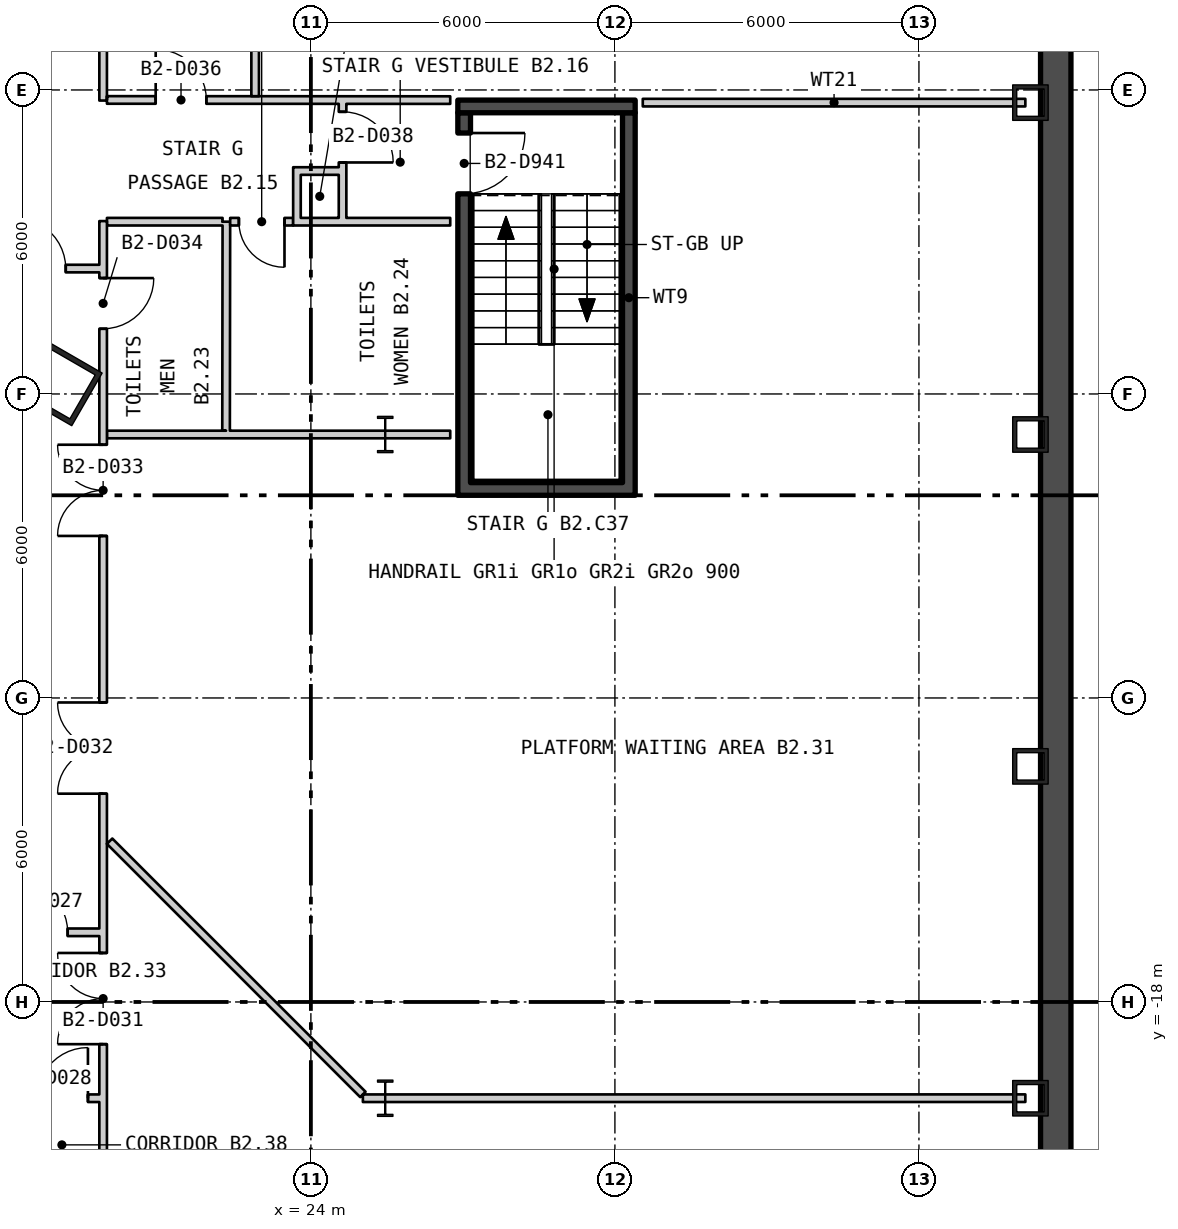
"""IFC4 building model, lengths in metres.
Left out: names, types, materials, properties, quantities, classifications, styles, units other than length and angle.
Written with IfcOpenShell. Run it as: python <this file> out.ifc"""

import sys

from ifc_helpers import new_model, si_unit, direction, frame, frame_2d, origin, origin_2d, place, context, subcontext, project, spatial, rectangle, hollow_rectangle, i_section, extrude, element, fill, save


model = new_model("IFC4")
c1 = context("Model", 3, precision=1e-05, world=origin(), true_north=direction((0.0, 1.0)))
c2 = subcontext(c1, "Body", "Model", "MODEL_VIEW")
j1 = project(units=[si_unit("LENGTHUNIT", "METRE"), si_unit("PLANEANGLEUNIT", "RADIAN")], contexts=[c1])
p1 = place(None, origin())
s1 = spatial("IfcSite", under=j1, at=p1, CompositionType="ELEMENT")
p2 = place(p1, origin())
s2 = spatial("IfcBuilding", under=s1, at=p2, CompositionType="ELEMENT")
p3 = place(p2, frame((0.0, 0.0, -11.4)))
s3 = spatial("IfcBuildingStorey", under=s2, at=p3, CompositionType="ELEMENT", Elevation=-11.4)
p4 = place(p3, frame((19.061, -5.807, 0.0), z_axis=(0.0, 0.0, 1.0), x_axis=(0.5, 0.866025403784, 0.0)))
e1 = element("IfcColumn", 1, at=p4, inside=s3, PredefinedType="COLUMN", context=c2, shape_type="SweptSolid", body=[
    extrude(hollow_rectangle(XDim=1.2, YDim=1.2, WallThickness=0.1, at=origin_2d()), origin(), (0.0, 0.0, 1.0), 5.7),
])
for number, where, z_axis, x_axis in (
    (2, (38.2, -19.9, 0.0), (0.0, 0.0, 1.0), (0.0, 1.0, 0.0)),
    (3, (38.2, -13.35, 0.0), (0.0, 0.0, 1.0), (0.0, 1.0, 0.0)),
    (4, (38.2, -6.8, 0.0), (0.0, 0.0, 1.0), (0.0, 1.0, 0.0)),
    (5, (38.2, -0.25, 0.0), (0.0, 0.0, 1.0), (0.0, 1.0, 0.0)),
):
    element("IfcColumn", number, at=place(p3, frame(where, z_axis=z_axis, x_axis=x_axis)), inside=s3, PredefinedType="COLUMN", context=c2, shape_type="SweptSolid", body=[
        extrude(hollow_rectangle(XDim=0.7, YDim=0.7, WallThickness=0.08, at=origin_2d()), origin(), (0.0, 0.0, 1.0), 5.7),
    ])
for number, where, z_axis, x_axis in (
    (6, (25.467, -6.8, 0.0), (0.0, 0.0, 1.0), (1.0, 0.0, 0.0)),
    (7, (25.467, -19.9, 0.0), (0.0, 0.0, 1.0), (1.0, 0.0, 0.0)),
):
    element("IfcColumn", number, at=place(p3, frame(where, z_axis=z_axis, x_axis=x_axis)), inside=s3, PredefinedType="COLUMN", context=c2, shape_type="SweptSolid", body=[
        extrude(i_section(OverallWidth=0.304, OverallDepth=0.716, WebThickness=0.021, FlangeThickness=0.04, at=origin_2d()), origin(), (0.0, 0.0, 1.0), 5.7),
    ])
p5 = place(p3, frame((38.7, -33.2, -0.4), z_axis=(0.0, 0.0, 1.0), x_axis=(0.0, 1.0, 0.0)))
e8 = element("IfcWall", 8, at=p5, inside=s3, PredefinedType="STANDARD", context=c2, shape_type="SweptSolid", body=[
    extrude(rectangle(XDim=52.8, YDim=0.6, at=frame_2d((26.4, 0.0))), origin(), (0.0, 0.0, 1.0), 5.7),
])
p6 = place(p3, frame((27.025, -7.75, 0.0), z_axis=(0.0, 0.0, 1.0), x_axis=(0.0, 1.0, 0.0)))
e9 = element("IfcWall", 9, at=p6, inside=s3, PredefinedType="SHEAR", context=c2, shape_type="SweptSolid", body=[
    extrude(rectangle(XDim=7.3, YDim=0.25, at=frame_2d((3.65, 0.0))), origin(), (0.0, 0.0, 1.0), 5.25),
])
p7 = place(p6, frame((5.7, 0.0, 0.0)))
e10 = element("IfcOpeningElement", 10, at=p7, cuts=e9, PredefinedType="OPENING", context=c2, shape_type="SweptSolid", body=[
    extrude(rectangle(XDim=1.2, YDim=2.1, at=frame_2d((0.6, 1.05))), frame((0.0, 0.135, 0.0), z_axis=(0.0, -1.0, 0.0), x_axis=(1.0, 0.0, 0.0)), (0.0, 0.0, 1.0), 0.27),
])
p8 = place(p3, frame((30.275, -7.75, 0.0), z_axis=(0.0, 0.0, 1.0), x_axis=(0.0, 1.0, 0.0)))
e11 = element("IfcWall", 11, at=p8, inside=s3, PredefinedType="SHEAR", context=c2, shape_type="SweptSolid", body=[
    extrude(rectangle(XDim=7.3, YDim=0.25, at=frame_2d((3.65, 0.0))), origin(), (0.0, 0.0, 1.0), 5.25),
])
for number, where, z_axis, x_axis in (
    (12, (26.9, -7.875, 0.0), (0.0, 0.0, 1.0), (1.0, 0.0, 0.0)),
    (13, (26.9, -0.325, 0.0), (0.0, 0.0, 1.0), (1.0, 0.0, 0.0)),
):
    element("IfcWall", number, at=place(p3, frame(where, z_axis=z_axis, x_axis=x_axis)), inside=s3, PredefinedType="SHEAR", context=c2, shape_type="SweptSolid", body=[
        extrude(rectangle(XDim=3.5, YDim=0.25, at=frame_2d((1.75, 0.0))), origin(), (0.0, 0.0, 1.0), 5.25),
    ])
p9 = place(p3, frame((17.5, -3.525, 0.0), z_axis=(0.0, 0.0, 1.0), x_axis=(1.0, 0.0, 0.0)))
e14 = element("IfcWall", 14, at=p9, inside=s3, PredefinedType="PARTITIONING", context=c2, shape_type="SweptSolid", body=[
    extrude(rectangle(XDim=2.325, YDim=0.15, at=frame_2d((1.163, 0.0))), origin(), (0.0, 0.0, 1.0), 5.25),
])
p10 = place(p9, frame((0.662, 0.0, 0.0)))
e15 = element("IfcOpeningElement", 15, at=p10, cuts=e14, PredefinedType="OPENING", context=c2, shape_type="SweptSolid", body=[
    extrude(rectangle(XDim=1.0, YDim=2.1, at=frame_2d((0.5, 1.05))), frame((0.0, 0.085, 0.0), z_axis=(0.0, -1.0, 0.0), x_axis=(1.0, 0.0, 0.0)), (0.0, 0.0, 1.0), 0.17),
])
p11 = place(p3, frame((17.575, -16.625, 0.0), z_axis=(0.0, 0.0, 1.0), x_axis=(1.0, 0.0, 0.0)))
e16 = element("IfcWall", 16, at=p11, inside=s3, PredefinedType="PARTITIONING", context=c2, shape_type="SweptSolid", body=[
    extrude(rectangle(XDim=2.25, YDim=0.15, at=frame_2d((1.125, 0.0))), origin(), (0.0, 0.0, 1.0), 5.25),
])
p12 = place(p11, frame((0.625, 0.0, 0.0)))
e17 = element("IfcOpeningElement", 17, at=p12, cuts=e16, PredefinedType="OPENING", context=c2, shape_type="SweptSolid", body=[
    extrude(rectangle(XDim=1.0, YDim=2.1, at=frame_2d((0.5, 1.05))), frame((0.0, 0.085, 0.0), z_axis=(0.0, -1.0, 0.0), x_axis=(1.0, 0.0, 0.0)), (0.0, 0.0, 1.0), 0.17),
])
p13 = place(p3, frame((18.375, -19.9, 0.0), z_axis=(0.0, 0.0, 1.0), x_axis=(1.0, 0.0, 0.0)))
e18 = element("IfcWall", 18, at=p13, inside=s3, PredefinedType="PARTITIONING", context=c2, shape_type="SweptSolid", body=[
    extrude(rectangle(XDim=1.45, YDim=0.15, at=frame_2d((0.725, 0.0))), origin(), (0.0, 0.0, 1.0), 5.25),
])
p14 = place(p13, frame((0.225, 0.0, 0.0)))
e19 = element("IfcOpeningElement", 19, at=p14, cuts=e18, PredefinedType="OPENING", context=c2, shape_type="SweptSolid", body=[
    extrude(rectangle(XDim=1.0, YDim=2.1, at=frame_2d((0.5, 1.05))), frame((0.0, 0.085, 0.0), z_axis=(0.0, -1.0, 0.0), x_axis=(1.0, 0.0, 0.0)), (0.0, 0.0, 1.0), 0.17),
])
p15 = place(p3, frame((19.9, -23.775, 0.0), z_axis=(0.0, 0.0, 1.0), x_axis=(0.0, 1.0, 0.0)))
e20 = element("IfcWall", 20, at=p15, inside=s3, PredefinedType="PARTITIONING", context=c2, shape_type="SweptSolid", body=[
    extrude(rectangle(XDim=21.187, YDim=0.15, at=frame_2d((10.594, 0.0))), origin(), (0.0, 0.0, 1.0), 5.25),
])
p16 = place(p15, frame((0.275, 0.0, 0.0)))
e21 = element("IfcOpeningElement", 21, at=p16, cuts=e20, PredefinedType="OPENING", context=c2, shape_type="SweptSolid", body=[
    extrude(rectangle(XDim=1.0, YDim=2.1, at=frame_2d((0.5, 1.05))), frame((0.0, 0.085, 0.0), z_axis=(0.0, -1.0, 0.0), x_axis=(1.0, 0.0, 0.0)), (0.0, 0.0, 1.0), 0.17),
])
p17 = place(p15, frame((4.942, 0.0, 0.0)))
e22 = element("IfcOpeningElement", 22, at=p17, cuts=e20, PredefinedType="OPENING", context=c2, shape_type="SweptSolid", body=[
    extrude(rectangle(XDim=1.8, YDim=2.1, at=frame_2d((0.9, 1.05))), frame((0.0, 0.085, 0.0), z_axis=(0.0, -1.0, 0.0), x_axis=(1.0, 0.0, 0.0)), (0.0, 0.0, 1.0), 0.17),
])
p18 = place(p15, frame((9.886, 0.0, 0.0)))
e23 = element("IfcOpeningElement", 23, at=p18, cuts=e20, PredefinedType="OPENING", context=c2, shape_type="SweptSolid", body=[
    extrude(rectangle(XDim=1.8, YDim=2.1, at=frame_2d((0.9, 1.05))), frame((0.0, 0.085, 0.0), z_axis=(0.0, -1.0, 0.0), x_axis=(1.0, 0.0, 0.0)), (0.0, 0.0, 1.0), 0.17),
])
p19 = place(p15, frame((14.973, 0.0, 0.0)))
e24 = element("IfcOpeningElement", 24, at=p19, cuts=e20, PredefinedType="OPENING", context=c2, shape_type="SweptSolid", body=[
    extrude(rectangle(XDim=1.8, YDim=2.1, at=frame_2d((0.9, 1.05))), frame((0.0, 0.085, 0.0), z_axis=(0.0, -1.0, 0.0), x_axis=(1.0, 0.0, 0.0)), (0.0, 0.0, 1.0), 0.17),
])
p20 = place(p15, frame((19.062, 0.0, 0.0)))
e25 = element("IfcOpeningElement", 25, at=p20, cuts=e20, PredefinedType="OPENING", context=c2, shape_type="SweptSolid", body=[
    extrude(rectangle(XDim=1.0, YDim=2.1, at=frame_2d((0.5, 1.05))), frame((0.0, 0.085, 0.0), z_axis=(0.0, -1.0, 0.0), x_axis=(1.0, 0.0, 0.0)), (0.0, 0.0, 1.0), 0.17),
])
p21 = place(p3, frame((19.9, -0.209, 0.0), z_axis=(0.0, 0.0, 1.0), x_axis=(0.0, 1.0, 0.0)))
e26 = element("IfcWall", 26, at=p21, inside=s3, PredefinedType="PARTITIONING", context=c2, shape_type="SweptSolid", body=[
    extrude(rectangle(XDim=18.134, YDim=0.15, at=frame_2d((9.067, 0.0))), origin(), (0.0, 0.0, 1.0), 5.25),
])
p22 = place(p21, frame((9.773, 0.0, 0.0)))
e27 = element("IfcOpeningElement", 27, at=p22, cuts=e26, PredefinedType="OPENING", context=c2, shape_type="SweptSolid", body=[
    extrude(rectangle(XDim=1.0, YDim=2.1, at=frame_2d((0.5, 1.05))), frame((0.0, 0.085, 0.0), z_axis=(0.0, -1.0, 0.0), x_axis=(1.0, 0.0, 0.0)), (0.0, 0.0, 1.0), 0.17),
])
p23 = place(p3, frame((19.975, -6.8, 0.0), z_axis=(0.0, 0.0, 1.0), x_axis=(1.0, 0.0, 0.0)))
e28 = element("IfcWall", 28, at=p23, inside=s3, PredefinedType="PARTITIONING", context=c2, shape_type="SweptSolid", body=[
    extrude(rectangle(XDim=6.775, YDim=0.15, at=frame_2d((3.388, 0.0))), origin(), (0.0, 0.0, 1.0), 5.25),
])
p24 = place(p3, frame((19.975, -2.6, 0.0), z_axis=(0.0, 0.0, 1.0), x_axis=(1.0, 0.0, 0.0)))
e29 = element("IfcWall", 29, at=p24, inside=s3, PredefinedType="PARTITIONING", context=c2, shape_type="SweptSolid", body=[
    extrude(rectangle(XDim=2.282, YDim=0.15, at=frame_2d((1.141, 0.0))), origin(), (0.0, 0.0, 1.0), 5.25),
])
p25 = place(p3, frame((19.975, -0.197, 0.0), z_axis=(0.0, 0.0, 1.0), x_axis=(0.999999901962, -0.000442804385, 0.0)))
e30 = element("IfcWall", 30, at=p25, inside=s3, PredefinedType="PARTITIONING", context=c2, shape_type="SweptSolid", body=[
    extrude(rectangle(XDim=6.775, YDim=0.15, at=frame_2d((3.388, 0.0))), origin(), (0.0, 0.0, 1.0), 5.25),
])
p26 = place(p25, frame((0.962, 0.0, 0.0)))
e31 = element("IfcOpeningElement", 31, at=p26, cuts=e30, PredefinedType="OPENING", context=c2, shape_type="SweptSolid", body=[
    extrude(rectangle(XDim=1.0, YDim=2.1, at=frame_2d((0.5, 1.05))), frame((0.0, 0.085, 0.0), z_axis=(0.0, -1.0, 0.0), x_axis=(1.0, 0.0, 0.0)), (0.0, 0.0, 1.0), 0.17),
])
p27 = place(p3, frame((20.028, -14.827, 0.0), z_axis=(0.0, 0.0, 1.0), x_axis=(0.707106781187, -0.707106781187, 0.0)))
e32 = element("IfcWall", 32, at=p27, inside=s3, PredefinedType="PARTITIONING", context=c2, shape_type="SweptSolid", body=[
    extrude(rectangle(XDim=7.068, YDim=0.15, at=frame_2d((3.534, 0.0))), origin(), (0.0, 0.0, 1.0), 5.25),
])
p28 = place(p3, frame((22.326, -6.725, 0.0), z_axis=(0.0, 0.0, 1.0), x_axis=(0.001454543916, 0.99999894215, 0.0)))
e33 = element("IfcWall", 33, at=p28, inside=s3, PredefinedType="PARTITIONING", context=c2, shape_type="SweptSolid", body=[
    extrude(rectangle(XDim=4.125, YDim=0.15, at=frame_2d((2.062, 0.0))), origin(), (0.0, 0.0, 1.0), 5.25),
])
p29 = place(p3, frame((22.407, -2.6, 0.0), z_axis=(0.0, 0.0, 1.0), x_axis=(1.0, 0.0, 0.0)))
e34 = element("IfcWall", 34, at=p29, inside=s3, PredefinedType="PARTITIONING", context=c2, shape_type="SweptSolid", body=[
    extrude(rectangle(XDim=1.243, YDim=0.15, at=frame_2d((0.622, 0.0))), origin(), (0.0, 0.0, 1.0), 5.25),
])
p30 = place(p29, frame((0.172, 0.0, 0.0)))
e35 = element("IfcOpeningElement", 35, at=p30, cuts=e34, PredefinedType="OPENING", context=c2, shape_type="SweptSolid", body=[
    extrude(rectangle(XDim=0.9, YDim=2.1, at=frame_2d((0.45, 1.05))), frame((0.0, 0.085, 0.0), z_axis=(0.0, -1.0, 0.0), x_axis=(1.0, 0.0, 0.0)), (0.0, 0.0, 1.0), 0.17),
])
p31 = place(p3, frame((22.9, -0.123, 0.0), z_axis=(0.0, 0.0, 1.0), x_axis=(0.0, 1.0, 0.0)))
e36 = element("IfcWall", 36, at=p31, inside=s3, PredefinedType="PARTITIONING", context=c2, shape_type="SweptSolid", body=[
    extrude(rectangle(XDim=2.851, YDim=0.15, at=frame_2d((1.425, 0.0))), origin(), (0.0, 0.0, 1.0), 5.25),
])
p32 = place(p3, frame((23.725, -2.675, 0.0), z_axis=(0.0, 0.0, 1.0), x_axis=(0.0, 1.0, 0.0)))
e37 = element("IfcWall", 37, at=p32, inside=s3, PredefinedType="PARTITIONING", context=c2, shape_type="SweptSolid", body=[
    extrude(rectangle(XDim=1.15, YDim=0.15, at=frame_2d((0.575, 0.0))), origin(), (0.0, 0.0, 1.0), 5.25),
])
for number, where, z_axis, x_axis in (
    (38, (23.8, -2.6, 0.0), (0.0, 0.0, 1.0), (1.0, 0.0, 0.0)),
    (39, (23.8, -1.6, 0.0), (0.0, 0.0, 1.0), (1.0, 0.0, 0.0)),
):
    element("IfcWall", number, at=place(p3, frame(where, z_axis=z_axis, x_axis=x_axis)), inside=s3, PredefinedType="PARTITIONING", context=c2, shape_type="SweptSolid", body=[
        extrude(rectangle(XDim=0.75, YDim=0.15, at=frame_2d((0.375, 0.0))), origin(), (0.0, 0.0, 1.0), 5.25),
    ])
p33 = place(p3, frame((24.625, -2.675, 0.0), z_axis=(0.0, 0.0, 1.0), x_axis=(0.0, 1.0, 0.0)))
e40 = element("IfcWall", 40, at=p33, inside=s3, PredefinedType="PARTITIONING", context=c2, shape_type="SweptSolid", body=[
    extrude(rectangle(XDim=1.087, YDim=0.15, at=frame_2d((0.543, 0.0))), origin(), (0.0, 0.0, 1.0), 5.25),
])
p34 = place(p3, frame((24.625, -1.588, 0.0), z_axis=(0.0, 0.0, 1.0), x_axis=(0.0, 1.0, 0.0)))
e41 = element("IfcWall", 41, at=p34, inside=s3, PredefinedType="PARTITIONING", context=c2, shape_type="SweptSolid", body=[
    extrude(rectangle(XDim=1.314, YDim=0.15, at=frame_2d((0.657, 0.0))), origin(), (0.0, 0.0, 1.0), 5.25),
])
p35 = place(p34, frame((0.157, 0.0, 0.0)))
e42 = element("IfcOpeningElement", 42, at=p35, cuts=e41, PredefinedType="OPENING", context=c2, shape_type="SweptSolid", body=[
    extrude(rectangle(XDim=1.0, YDim=2.1, at=frame_2d((0.5, 1.05))), frame((0.0, 0.085, 0.0), z_axis=(0.0, -1.0, 0.0), x_axis=(1.0, 0.0, 0.0)), (0.0, 0.0, 1.0), 0.17),
])
p36 = place(p3, frame((24.7, -2.6, 0.0), z_axis=(0.0, 0.0, 1.0), x_axis=(1.0, 0.0, 0.0)))
e43 = element("IfcWall", 43, at=p36, inside=s3, PredefinedType="PARTITIONING", context=c2, shape_type="SweptSolid", body=[
    extrude(rectangle(XDim=2.05, YDim=0.15, at=frame_2d((1.025, 0.0))), origin(), (0.0, 0.0, 1.0), 5.25),
])
p37 = place(p3, frame((25.026, -19.9, 0.0), z_axis=(0.0, 0.0, 1.0), x_axis=(0.999999997075, 7.6487685e-05, 0.0)))
e44 = element("IfcWall", 44, at=p37, inside=s3, PredefinedType="PARTITIONING", context=c2, shape_type="SweptSolid", body=[
    extrude(rectangle(XDim=13.074, YDim=0.15, at=frame_2d((6.537, 0.0))), origin(), (0.0, 0.0, 1.0), 5.25),
])
p38 = place(p3, frame((30.55, -0.25, 0.0), z_axis=(0.0, 0.0, 1.0), x_axis=(1.0, 0.0, 0.0)))
e45 = element("IfcWall", 45, at=p38, inside=s3, PredefinedType="PARTITIONING", context=c2, shape_type="SweptSolid", body=[
    extrude(rectangle(XDim=7.55, YDim=0.15, at=frame_2d((3.775, 0.0))), origin(), (0.0, 0.0, 1.0), 5.25),
])
p39 = place(p7, origin())
e46 = element("IfcDoor", 46, at=p39, inside=s3, OperationType="SINGLE_SWING_RIGHT", PredefinedType="DOOR", context=c2, shape_type="SweptSolid", body=[
    extrude(rectangle(XDim=1.2, YDim=2.1, at=frame_2d((0.6, 1.05))), frame((0.0, 0.025, 0.0), z_axis=(0.0, -1.0, 0.0), x_axis=(1.0, 0.0, 0.0)), (0.0, 0.0, 1.0), 0.05),
])
fill(e10, e46)
p40 = place(p10, origin())
e47 = element("IfcDoor", 47, at=p40, inside=s3, OperationType="SINGLE_SWING_RIGHT", PredefinedType="DOOR", context=c2, shape_type="SweptSolid", body=[
    extrude(rectangle(XDim=1.0, YDim=2.1, at=frame_2d((0.5, 1.05))), frame((0.0, 0.025, 0.0), z_axis=(0.0, -1.0, 0.0), x_axis=(1.0, 0.0, 0.0)), (0.0, 0.0, 1.0), 0.05),
])
fill(e15, e47)
p41 = place(p12, origin())
e48 = element("IfcDoor", 48, at=p41, inside=s3, OperationType="SINGLE_SWING_RIGHT", PredefinedType="DOOR", context=c2, shape_type="SweptSolid", body=[
    extrude(rectangle(XDim=1.0, YDim=2.1, at=frame_2d((0.5, 1.05))), frame((0.0, 0.025, 0.0), z_axis=(0.0, -1.0, 0.0), x_axis=(1.0, 0.0, 0.0)), (0.0, 0.0, 1.0), 0.05),
])
fill(e17, e48)
p42 = place(p14, origin())
e49 = element("IfcDoor", 49, at=p42, inside=s3, OperationType="SINGLE_SWING_LEFT", PredefinedType="DOOR", context=c2, shape_type="SweptSolid", body=[
    extrude(rectangle(XDim=1.0, YDim=2.1, at=frame_2d((0.5, 1.05))), frame((0.0, 0.025, 0.0), z_axis=(0.0, -1.0, 0.0), x_axis=(1.0, 0.0, 0.0)), (0.0, 0.0, 1.0), 0.05),
])
fill(e19, e49)
p43 = place(p17, origin())
e50 = element("IfcDoor", 50, at=p43, inside=s3, OperationType="DOUBLE_DOOR_SINGLE_SWING", PredefinedType="DOOR", context=c2, shape_type="SweptSolid", body=[
    extrude(rectangle(XDim=1.8, YDim=2.1, at=frame_2d((0.9, 1.05))), frame((0.0, 0.025, 0.0), z_axis=(0.0, -1.0, 0.0), x_axis=(1.0, 0.0, 0.0)), (0.0, 0.0, 1.0), 0.05),
])
fill(e22, e50)
p44 = place(p18, origin())
e51 = element("IfcDoor", 51, at=p44, inside=s3, OperationType="DOUBLE_DOOR_SINGLE_SWING", PredefinedType="DOOR", context=c2, shape_type="SweptSolid", body=[
    extrude(rectangle(XDim=1.8, YDim=2.1, at=frame_2d((0.9, 1.05))), frame((0.0, 0.025, 0.0), z_axis=(0.0, -1.0, 0.0), x_axis=(1.0, 0.0, 0.0)), (0.0, 0.0, 1.0), 0.05),
])
fill(e23, e51)
p45 = place(p19, origin())
e52 = element("IfcDoor", 52, at=p45, inside=s3, OperationType="DOUBLE_DOOR_SINGLE_SWING", PredefinedType="DOOR", context=c2, shape_type="SweptSolid", body=[
    extrude(rectangle(XDim=1.8, YDim=2.1, at=frame_2d((0.9, 1.05))), frame((0.0, 0.025, 0.0), z_axis=(0.0, -1.0, 0.0), x_axis=(1.0, 0.0, 0.0)), (0.0, 0.0, 1.0), 0.05),
])
fill(e24, e52)
p46 = place(p20, origin())
e53 = element("IfcDoor", 53, at=p46, inside=s3, OperationType="SINGLE_SWING_RIGHT", PredefinedType="DOOR", context=c2, shape_type="SweptSolid", body=[
    extrude(rectangle(XDim=1.0, YDim=2.1, at=frame_2d((0.5, 1.05))), frame((0.0, 0.025, 0.0), z_axis=(0.0, -1.0, 0.0), x_axis=(1.0, 0.0, 0.0)), (0.0, 0.0, 1.0), 0.05),
])
fill(e25, e53)
p47 = place(p26, origin())
e54 = element("IfcDoor", 54, at=p47, inside=s3, OperationType="SINGLE_SWING_RIGHT", PredefinedType="DOOR", context=c2, shape_type="SweptSolid", body=[
    extrude(rectangle(XDim=1.0, YDim=2.1, at=frame_2d((0.5, 1.05))), frame((0.0, 0.025, 0.0), z_axis=(0.0, -1.0, 0.0), x_axis=(1.0, 0.0, 0.0)), (0.0, 0.0, 1.0), 0.05),
])
fill(e31, e54)
p48 = place(p30, origin())
e55 = element("IfcDoor", 55, at=p48, inside=s3, OperationType="SINGLE_SWING_RIGHT", PredefinedType="DOOR", context=c2, shape_type="SweptSolid", body=[
    extrude(rectangle(XDim=0.9, YDim=2.1, at=frame_2d((0.45, 1.05))), frame((0.0, 0.025, 0.0), z_axis=(0.0, -1.0, 0.0), x_axis=(1.0, 0.0, 0.0)), (0.0, 0.0, 1.0), 0.05),
])
fill(e35, e55)
p49 = place(p35, origin())
e56 = element("IfcDoor", 56, at=p49, inside=s3, OperationType="SINGLE_SWING_LEFT", PredefinedType="DOOR", context=c2, shape_type="SweptSolid", body=[
    extrude(rectangle(XDim=1.0, YDim=2.1, at=frame_2d((0.5, 1.05))), frame((0.0, 0.025, 0.0), z_axis=(0.0, -1.0, 0.0), x_axis=(1.0, 0.0, 0.0)), (0.0, 0.0, 1.0), 0.05),
])
fill(e42, e56)
save(model, sys.argv[1])
